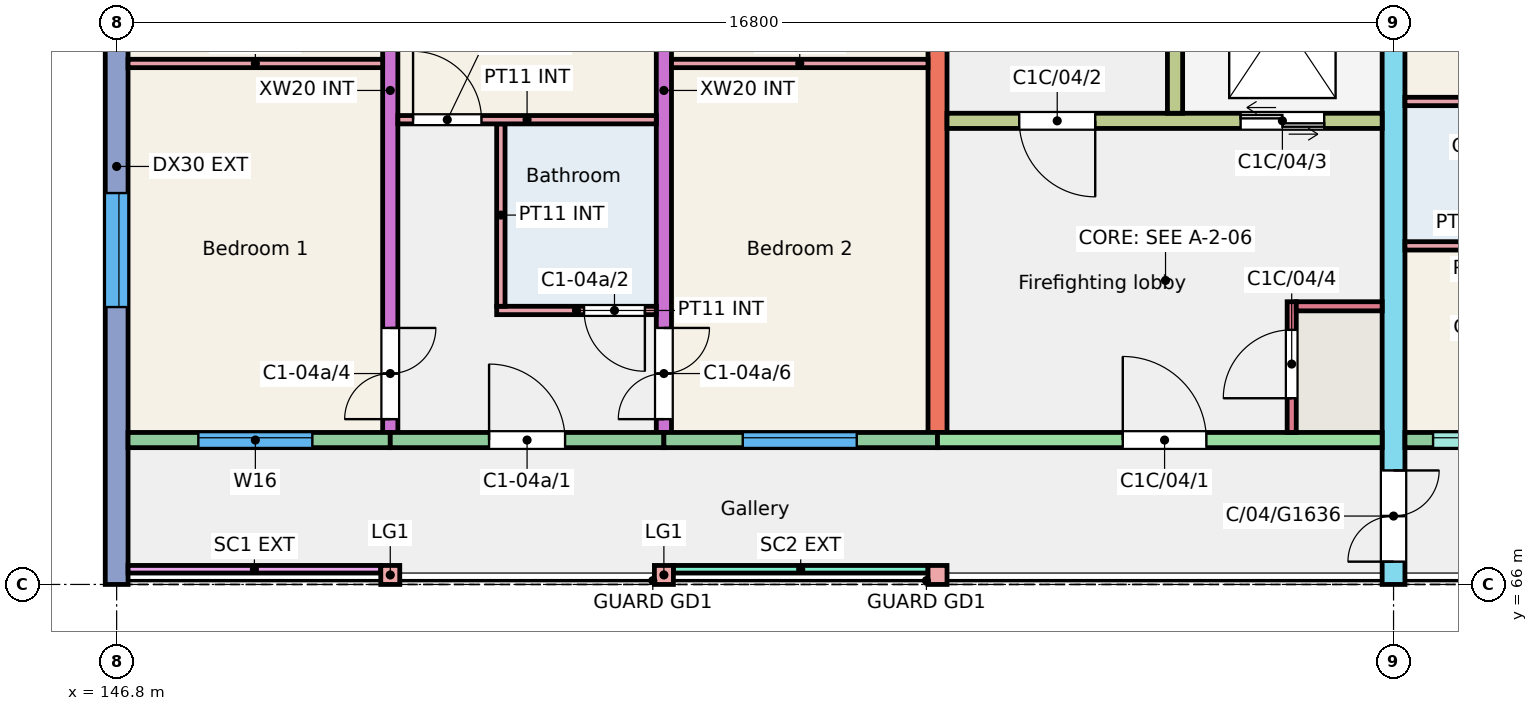
"""IFC4 building model, lengths in metres.
Left out: names, types, materials, properties, quantities, classifications, styles, units other than length and angle.
Written with IfcOpenShell. Run it as: python <this file> out.ifc"""

import sys

from ifc_helpers import new_model, si_unit, direction, frame, frame_2d, origin, origin_2d, place, context, subcontext, project, spatial, rectangle, extrude, element, fill, save


model = new_model("IFC4")
c1 = context("Model", 3, precision=1e-05, world=origin(), true_north=direction((0.0, 1.0)))
c2 = subcontext(c1, "Body", "Model", "MODEL_VIEW")
j1 = project(units=[si_unit("LENGTHUNIT", "METRE"), si_unit("PLANEANGLEUNIT", "RADIAN")], contexts=[c1])
p1 = place(None, origin())
s1 = spatial("IfcSite", under=j1, at=p1, CompositionType="ELEMENT")
p2 = place(p1, origin())
s2 = spatial("IfcBuilding", under=s1, at=p2, CompositionType="ELEMENT")
p3 = place(p2, frame((0.0, 0.0, 12.0)))
s3 = spatial("IfcBuildingStorey", under=s2, at=p3, CompositionType="ELEMENT", Elevation=12.0)
p4 = place(p3, frame((146.8, 66.0, 0.0), z_axis=(0.0, 0.0, 1.0), x_axis=(0.0, 1.0, 0.0)))
e1 = element("IfcWall", 1, at=p4, inside=s3, PredefinedType="SHEAR", context=c2, shape_type="SweptSolid", body=[
    extrude(rectangle(XDim=11.0, YDim=0.3, at=frame_2d((5.5, 0.0))), origin(), (0.0, 0.0, 1.0), 3.0),
])
p5 = place(p4, frame((3.65, 0.0, 0.9)))
e2 = element("IfcOpeningElement", 2, at=p5, cuts=e1, PredefinedType="OPENING", context=c2, shape_type="SweptSolid", body=[
    extrude(rectangle(XDim=1.5, YDim=1.5, at=frame_2d((0.75, 0.75))), frame((0.0, 0.16, 0.0), z_axis=(0.0, -1.0, 0.0), x_axis=(1.0, 0.0, 0.0)), (0.0, 0.0, 1.0), 0.32),
])
p6 = place(p4, frame((8.355, 0.0, 0.9)))
e3 = element("IfcOpeningElement", 3, at=p6, cuts=e1, PredefinedType="OPENING", context=c2, shape_type="SweptSolid", body=[
    extrude(rectangle(XDim=1.2, YDim=1.5, at=frame_2d((0.6, 0.75))), frame((0.0, 0.16, 0.0), z_axis=(0.0, -1.0, 0.0), x_axis=(1.0, 0.0, 0.0)), (0.0, 0.0, 1.0), 0.32),
])
p7 = place(p3, frame((150.4, 68.0, 0.0), z_axis=(0.0, 0.0, 1.0), x_axis=(0.0, 1.0, 0.0)))
e4 = element("IfcWall", 4, at=p7, inside=s3, PredefinedType="SHEAR", context=c2, shape_type="SweptSolid", body=[
    extrude(rectangle(XDim=9.0, YDim=0.2, at=frame_2d((4.5, 0.0))), origin(), (0.0, 0.0, 1.0), 3.0),
])
p8 = place(p7, frame((0.175, 0.0, 0.0)))
e5 = element("IfcOpeningElement", 5, at=p8, cuts=e4, PredefinedType="OPENING", context=c2, shape_type="SweptSolid", body=[
    extrude(rectangle(XDim=1.2, YDim=2.1, at=frame_2d((0.6, 1.05))), frame((0.0, 0.11, 0.0), z_axis=(0.0, -1.0, 0.0), x_axis=(1.0, 0.0, 0.0)), (0.0, 0.0, 1.0), 0.22),
])
p9 = place(p7, frame((6.4, 0.0, 0.0)))
e6 = element("IfcOpeningElement", 6, at=p9, cuts=e4, PredefinedType="OPENING", context=c2, shape_type="SweptSolid", body=[
    extrude(rectangle(XDim=1.2, YDim=2.1, at=frame_2d((0.6, 1.05))), frame((0.0, 0.11, 0.0), z_axis=(0.0, -1.0, 0.0), x_axis=(1.0, 0.0, 0.0)), (0.0, 0.0, 1.0), 0.22),
])
p10 = place(p3, frame((154.0, 68.0, 0.0), z_axis=(0.0, 0.0, 1.0), x_axis=(0.0, 1.0, 0.0)))
e7 = element("IfcWall", 7, at=p10, inside=s3, PredefinedType="SHEAR", context=c2, shape_type="SweptSolid", body=[
    extrude(rectangle(XDim=9.0, YDim=0.2, at=frame_2d((4.5, 0.0))), origin(), (0.0, 0.0, 1.0), 3.0),
])
p11 = place(p10, frame((0.175, 0.0, 0.0)))
e8 = element("IfcOpeningElement", 8, at=p11, cuts=e7, PredefinedType="OPENING", context=c2, shape_type="SweptSolid", body=[
    extrude(rectangle(XDim=1.2, YDim=2.1, at=frame_2d((0.6, 1.05))), frame((0.0, 0.11, 0.0), z_axis=(0.0, -1.0, 0.0), x_axis=(1.0, 0.0, 0.0)), (0.0, 0.0, 1.0), 0.22),
])
p12 = place(p10, frame((6.4, 0.0, 0.0)))
e9 = element("IfcOpeningElement", 9, at=p12, cuts=e7, PredefinedType="OPENING", context=c2, shape_type="SweptSolid", body=[
    extrude(rectangle(XDim=1.2, YDim=2.1, at=frame_2d((0.6, 1.05))), frame((0.0, 0.11, 0.0), z_axis=(0.0, -1.0, 0.0), x_axis=(1.0, 0.0, 0.0)), (0.0, 0.0, 1.0), 0.22),
])
p13 = place(p3, frame((157.6, 68.0, 0.0), z_axis=(0.0, 0.0, 1.0), x_axis=(0.0, 1.0, 0.0)))
e10 = element("IfcWall", 10, at=p13, inside=s3, PredefinedType="SHEAR", context=c2, shape_type="SweptSolid", body=[
    extrude(rectangle(XDim=9.0, YDim=0.25, at=frame_2d((4.5, 0.0))), origin(), (0.0, 0.0, 1.0), 3.0),
])
p14 = place(p3, frame((163.6, 66.0, 0.0), z_axis=(0.0, 0.0, 1.0), x_axis=(0.0, 1.0, 0.0)))
e11 = element("IfcWall", 11, at=p14, inside=s3, PredefinedType="SHEAR", context=c2, shape_type="SweptSolid", body=[
    extrude(rectangle(XDim=11.0, YDim=0.3, at=frame_2d((5.5, 0.0))), origin(), (0.0, 0.0, 1.0), 3.0),
])
p15 = place(p14, frame((0.3, 0.0, 0.0)))
e12 = element("IfcOpeningElement", 12, at=p15, cuts=e11, PredefinedType="OPENING", context=c2, shape_type="SweptSolid", body=[
    extrude(rectangle(XDim=1.2, YDim=2.1, at=frame_2d((0.6, 1.05))), frame((0.0, 0.16, 0.0), z_axis=(0.0, -1.0, 0.0), x_axis=(1.0, 0.0, 0.0)), (0.0, 0.0, 1.0), 0.32),
])
p16 = place(p3, frame((146.95, 67.9, 0.0), z_axis=(0.0, 0.0, 1.0), x_axis=(1.0, 0.0, 0.0)))
e13 = element("IfcWall", 13, at=p16, inside=s3, PredefinedType="SOLIDWALL", context=c2, shape_type="SweptSolid", body=[
    extrude(rectangle(XDim=3.45, YDim=0.2, at=frame_2d((1.725, 0.0))), origin(), (0.0, 0.0, 1.0), 3.0),
])
p17 = place(p16, frame((0.925, 0.0, 0.9)))
e14 = element("IfcOpeningElement", 14, at=p17, cuts=e13, PredefinedType="OPENING", context=c2, shape_type="SweptSolid", body=[
    extrude(rectangle(XDim=1.5, YDim=1.5, at=frame_2d((0.75, 0.75))), frame((0.0, 0.11, 0.0), z_axis=(0.0, -1.0, 0.0), x_axis=(1.0, 0.0, 0.0)), (0.0, 0.0, 1.0), 0.22),
])
p18 = place(p3, frame((150.4, 67.9, 0.0), z_axis=(0.0, 0.0, 1.0), x_axis=(1.0, 0.0, 0.0)))
e15 = element("IfcWall", 15, at=p18, inside=s3, PredefinedType="SOLIDWALL", context=c2, shape_type="SweptSolid", body=[
    extrude(rectangle(XDim=3.6, YDim=0.2, at=frame_2d((1.8, 0.0))), origin(), (0.0, 0.0, 1.0), 3.0),
])
p19 = place(p18, frame((1.3, 0.0, 0.0)))
e16 = element("IfcOpeningElement", 16, at=p19, cuts=e15, PredefinedType="OPENING", context=c2, shape_type="SweptSolid", body=[
    extrude(rectangle(XDim=1.0, YDim=2.1, at=frame_2d((0.5, 1.05))), frame((0.0, 0.11, 0.0), z_axis=(0.0, -1.0, 0.0), x_axis=(1.0, 0.0, 0.0)), (0.0, 0.0, 1.0), 0.22),
])
p20 = place(p3, frame((154.0, 67.9, 0.0), z_axis=(0.0, 0.0, 1.0), x_axis=(1.0, 0.0, 0.0)))
e17 = element("IfcWall", 17, at=p20, inside=s3, PredefinedType="SOLIDWALL", context=c2, shape_type="SweptSolid", body=[
    extrude(rectangle(XDim=3.6, YDim=0.2, at=frame_2d((1.8, 0.0))), origin(), (0.0, 0.0, 1.0), 3.0),
])
p21 = place(p20, frame((1.038, 0.0, 0.9)))
e18 = element("IfcOpeningElement", 18, at=p21, cuts=e17, PredefinedType="OPENING", context=c2, shape_type="SweptSolid", body=[
    extrude(rectangle(XDim=1.5, YDim=1.5, at=frame_2d((0.75, 0.75))), frame((0.0, 0.11, 0.0), z_axis=(0.0, -1.0, 0.0), x_axis=(1.0, 0.0, 0.0)), (0.0, 0.0, 1.0), 0.22),
])
p22 = place(p3, frame((157.6, 67.9, 0.0), z_axis=(0.0, 0.0, 1.0), x_axis=(1.0, 0.0, 0.0)))
e19 = element("IfcWall", 19, at=p22, inside=s3, PredefinedType="SHEAR", context=c2, shape_type="SweptSolid", body=[
    extrude(rectangle(XDim=5.85, YDim=0.2, at=frame_2d((2.925, 0.0))), origin(), (0.0, 0.0, 1.0), 3.0),
])
p23 = place(p22, frame((2.438, 0.0, 0.0)))
e20 = element("IfcOpeningElement", 20, at=p23, cuts=e19, PredefinedType="OPENING", context=c2, shape_type="SweptSolid", body=[
    extrude(rectangle(XDim=1.1, YDim=2.1, at=frame_2d((0.55, 1.05))), frame((0.0, 0.11, 0.0), z_axis=(0.0, -1.0, 0.0), x_axis=(1.0, 0.0, 0.0)), (0.0, 0.0, 1.0), 0.22),
])
p24 = place(p3, frame((157.725, 72.1, 0.0), z_axis=(0.0, 0.0, 1.0), x_axis=(1.0, 0.0, 0.0)))
e21 = element("IfcWall", 21, at=p24, inside=s3, PredefinedType="SHEAR", context=c2, shape_type="SweptSolid", body=[
    extrude(rectangle(XDim=5.725, YDim=0.2, at=frame_2d((2.862, 0.0))), origin(), (0.0, 0.0, 1.0), 3.0),
])
p25 = place(p24, frame((0.95, 0.0, 0.0)))
e22 = element("IfcOpeningElement", 22, at=p25, cuts=e21, PredefinedType="OPENING", context=c2, shape_type="SweptSolid", body=[
    extrude(rectangle(XDim=1.0, YDim=2.1, at=frame_2d((0.5, 1.05))), frame((0.0, 0.11, 0.0), z_axis=(0.0, -1.0, 0.0), x_axis=(1.0, 0.0, 0.0)), (0.0, 0.0, 1.0), 0.22),
])
p26 = place(p24, frame((3.863, 0.0, 0.0)))
e23 = element("IfcOpeningElement", 23, at=p26, cuts=e21, PredefinedType="OPENING", context=c2, shape_type="SweptSolid", body=[
    extrude(rectangle(XDim=1.1, YDim=2.1, at=frame_2d((0.55, 1.05))), frame((0.0, 0.11, 0.0), z_axis=(0.0, -1.0, 0.0), x_axis=(1.0, 0.0, 0.0)), (0.0, 0.0, 1.0), 0.22),
])
p27 = place(p3, frame((160.725, 72.2, 0.0), z_axis=(0.0, 0.0, 1.0), x_axis=(0.0, 1.0, 0.0)))
e24 = element("IfcWall", 24, at=p27, inside=s3, PredefinedType="SHEAR", context=c2, shape_type="SweptSolid", body=[
    extrude(rectangle(XDim=4.8, YDim=0.2, at=frame_2d((2.4, 0.0))), origin(), (0.0, 0.0, 1.0), 3.0),
])
p28 = place(p3, frame((162.26, 68.0, 0.0), z_axis=(0.0, 0.0, 1.0), x_axis=(0.0, 1.0, 0.0)))
e25 = element("IfcWall", 25, at=p28, inside=s3, PredefinedType="SHEAR", context=c2, shape_type="SweptSolid", body=[
    extrude(rectangle(XDim=1.72, YDim=0.12, at=frame_2d((0.86, 0.0))), origin(), (0.0, 0.0, 1.0), 3.0),
])
p29 = place(p28, frame((0.45, 0.0, 0.0)))
e26 = element("IfcOpeningElement", 26, at=p29, cuts=e25, PredefinedType="OPENING", context=c2, shape_type="SweptSolid", body=[
    extrude(rectangle(XDim=0.9, YDim=2.1, at=frame_2d((0.45, 1.05))), frame((0.0, 0.07, 0.0), z_axis=(0.0, -1.0, 0.0), x_axis=(1.0, 0.0, 0.0)), (0.0, 0.0, 1.0), 0.14),
])
p30 = place(p3, frame((162.32, 69.66, 0.0), z_axis=(0.0, 0.0, 1.0), x_axis=(1.0, 0.0, 0.0)))
e27 = element("IfcWall", 27, at=p30, inside=s3, PredefinedType="SHEAR", context=c2, shape_type="SweptSolid", body=[
    extrude(rectangle(XDim=1.13, YDim=0.12, at=frame_2d((0.565, 0.0))), origin(), (0.0, 0.0, 1.0), 3.0),
])
p31 = place(p3, frame((163.75, 67.9, 0.0), z_axis=(0.0, 0.0, 1.0), x_axis=(1.0, 0.0, 0.0)))
e28 = element("IfcWall", 28, at=p31, inside=s3, PredefinedType="SOLIDWALL", context=c2, shape_type="SweptSolid", body=[
    extrude(rectangle(XDim=3.45, YDim=0.2, at=frame_2d((1.725, 0.0))), origin(), (0.0, 0.0, 1.0), 3.0),
])
p32 = place(p31, frame((0.37, 0.0, 1.1)))
e29 = element("IfcOpeningElement", 29, at=p32, cuts=e28, PredefinedType="OPENING", context=c2, shape_type="SweptSolid", body=[
    extrude(rectangle(XDim=1.2, YDim=1.3, at=frame_2d((0.6, 0.65))), frame((0.0, 0.11, 0.0), z_axis=(0.0, -1.0, 0.0), x_axis=(1.0, 0.0, 0.0)), (0.0, 0.0, 1.0), 0.22),
])
p33 = place(p31, frame((2.2, 0.0, 0.0)))
e30 = element("IfcOpeningElement", 30, at=p33, cuts=e28, PredefinedType="OPENING", context=c2, shape_type="SweptSolid", body=[
    extrude(rectangle(XDim=1.0, YDim=2.1, at=frame_2d((0.5, 1.05))), frame((0.0, 0.11, 0.0), z_axis=(0.0, -1.0, 0.0), x_axis=(1.0, 0.0, 0.0)), (0.0, 0.0, 1.0), 0.22),
])
for number, where, z_axis, x_axis in (
    (31, (150.4, 66.125, 0.0), (0.0, 0.0, 1.0), (1.0, 0.0, 0.0)),
    (32, (154.0, 66.125, 0.0), (0.0, 0.0, 1.0), (1.0, 0.0, 0.0)),
    (33, (157.6, 66.125, 0.0), (0.0, 0.0, 1.0), (1.0, 0.0, 0.0)),
):
    element("IfcColumn", number, at=place(p3, frame(where, z_axis=z_axis, x_axis=x_axis)), inside=s3, PredefinedType="COLUMN", context=c2, shape_type="SweptSolid", body=[
        extrude(rectangle(XDim=0.25, YDim=0.25, at=origin_2d()), origin(), (0.0, 0.0, 1.0), 3.0),
    ])
p34 = place(p3, frame((146.95, 66.2, 0.0), z_axis=(0.0, 0.0, 1.0), x_axis=(1.0, 0.0, 0.0)))
e34 = element("IfcWall", 34, at=p34, inside=s3, PredefinedType="SOLIDWALL", context=c2, shape_type="SweptSolid", body=[
    extrude(rectangle(XDim=3.325, YDim=0.1, at=frame_2d((1.663, 0.0))), origin(), (0.0, 0.0, 1.0), 2.45),
])
p35 = place(p3, frame((154.125, 66.2, 0.0), z_axis=(0.0, 0.0, 1.0), x_axis=(1.0, 0.0, 0.0)))
e35 = element("IfcWall", 35, at=p35, inside=s3, PredefinedType="SOLIDWALL", context=c2, shape_type="SweptSolid", body=[
    extrude(rectangle(XDim=3.35, YDim=0.1, at=frame_2d((1.675, 0.0))), origin(), (0.0, 0.0, 1.0), 2.45),
])
p36 = place(p3, frame((151.8, 69.605, 0.0), z_axis=(0.0, 0.0, 1.0), x_axis=(1.0, 0.0, 0.0)))
e36 = element("IfcWall", 36, at=p36, inside=s3, PredefinedType="PARTITIONING", context=c2, shape_type="SweptSolid", body=[
    extrude(rectangle(XDim=2.1, YDim=0.11, at=frame_2d((1.05, 0.0))), origin(), (0.0, 0.0, 1.0), 2.8),
])
p37 = place(p36, frame((1.15, 0.0, 0.0)))
e37 = element("IfcOpeningElement", 37, at=p37, cuts=e36, PredefinedType="OPENING", context=c2, shape_type="SweptSolid", body=[
    extrude(rectangle(XDim=0.8, YDim=2.1, at=frame_2d((0.4, 1.05))), frame((0.0, 0.065, 0.0), z_axis=(0.0, -1.0, 0.0), x_axis=(1.0, 0.0, 0.0)), (0.0, 0.0, 1.0), 0.13),
])
p38 = place(p3, frame((151.855, 69.66, 0.0), z_axis=(0.0, 0.0, 1.0), x_axis=(0.0, 1.0, 0.0)))
e38 = element("IfcWall", 38, at=p38, inside=s3, PredefinedType="PARTITIONING", context=c2, shape_type="SweptSolid", body=[
    extrude(rectangle(XDim=2.4, YDim=0.11, at=frame_2d((1.2, 0.0))), origin(), (0.0, 0.0, 1.0), 2.8),
])
p39 = place(p3, frame((150.5, 72.115, 0.0), z_axis=(0.0, 0.0, 1.0), x_axis=(1.0, 0.0, 0.0)))
e39 = element("IfcWall", 39, at=p39, inside=s3, PredefinedType="PARTITIONING", context=c2, shape_type="SweptSolid", body=[
    extrude(rectangle(XDim=3.4, YDim=0.11, at=frame_2d((1.7, 0.0))), origin(), (0.0, 0.0, 1.0), 2.8),
])
p40 = place(p39, frame((0.2, 0.0, 0.0)))
e40 = element("IfcOpeningElement", 40, at=p40, cuts=e39, PredefinedType="OPENING", context=c2, shape_type="SweptSolid", body=[
    extrude(rectangle(XDim=0.9, YDim=2.1, at=frame_2d((0.45, 1.05))), frame((0.0, 0.065, 0.0), z_axis=(0.0, -1.0, 0.0), x_axis=(1.0, 0.0, 0.0)), (0.0, 0.0, 1.0), 0.13),
])
p41 = place(p3, frame((146.95, 72.855, 0.0), z_axis=(0.0, 0.0, 1.0), x_axis=(1.0, 0.0, 0.0)))
e41 = element("IfcWall", 41, at=p41, inside=s3, PredefinedType="PARTITIONING", context=c2, shape_type="SweptSolid", body=[
    extrude(rectangle(XDim=3.35, YDim=0.11, at=frame_2d((1.675, 0.0))), origin(), (0.0, 0.0, 1.0), 2.8),
])
p42 = place(p3, frame((154.1, 72.855, 0.0), z_axis=(0.0, 0.0, 1.0), x_axis=(1.0, 0.0, 0.0)))
e42 = element("IfcWall", 42, at=p42, inside=s3, PredefinedType="PARTITIONING", context=c2, shape_type="SweptSolid", body=[
    extrude(rectangle(XDim=3.375, YDim=0.11, at=frame_2d((1.688, 0.0))), origin(), (0.0, 0.0, 1.0), 2.8),
])
p43 = place(p3, frame((163.75, 70.455, 0.0), z_axis=(0.0, 0.0, 1.0), x_axis=(1.0, 0.0, 0.0)))
e43 = element("IfcWall", 43, at=p43, inside=s3, PredefinedType="PARTITIONING", context=c2, shape_type="SweptSolid", body=[
    extrude(rectangle(XDim=1.94, YDim=0.11, at=frame_2d((0.97, 0.0))), origin(), (0.0, 0.0, 1.0), 2.8),
])
p44 = place(p3, frame((163.75, 72.355, 0.0), z_axis=(0.0, 0.0, 1.0), x_axis=(1.0, 0.0, 0.0)))
e44 = element("IfcWall", 44, at=p44, inside=s3, PredefinedType="PARTITIONING", context=c2, shape_type="SweptSolid", body=[
    extrude(rectangle(XDim=3.35, YDim=0.11, at=frame_2d((1.675, 0.0))), origin(), (0.0, 0.0, 1.0), 2.8),
])
p45 = place(p44, frame((2.25, 0.0, 0.0)))
e45 = element("IfcOpeningElement", 45, at=p45, cuts=e44, PredefinedType="OPENING", context=c2, shape_type="SweptSolid", body=[
    extrude(rectangle(XDim=0.9, YDim=2.1, at=frame_2d((0.45, 1.05))), frame((0.0, 0.065, 0.0), z_axis=(0.0, -1.0, 0.0), x_axis=(1.0, 0.0, 0.0)), (0.0, 0.0, 1.0), 0.13),
])
p46 = place(p17, origin())
e46 = element("IfcWindow", 46, at=p46, inside=s3, PartitioningType="SINGLE_PANEL", PredefinedType="WINDOW", context=c2, shape_type="SweptSolid", body=[
    extrude(rectangle(XDim=1.5, YDim=1.5, at=frame_2d((0.75, 0.75))), frame((0.0, 0.06, 0.0), z_axis=(0.0, -1.0, 0.0), x_axis=(1.0, 0.0, 0.0)), (0.0, 0.0, 1.0), 0.06),
])
fill(e14, e46)
p47 = place(p21, origin())
e47 = element("IfcWindow", 47, at=p47, inside=s3, PartitioningType="SINGLE_PANEL", PredefinedType="WINDOW", context=c2, shape_type="SweptSolid", body=[
    extrude(rectangle(XDim=1.5, YDim=1.5, at=frame_2d((0.75, 0.75))), frame((0.0, 0.06, 0.0), z_axis=(0.0, -1.0, 0.0), x_axis=(1.0, 0.0, 0.0)), (0.0, 0.0, 1.0), 0.06),
])
fill(e18, e47)
p48 = place(p5, origin())
e48 = element("IfcWindow", 48, at=p48, inside=s3, PartitioningType="SINGLE_PANEL", PredefinedType="WINDOW", context=c2, shape_type="SweptSolid", body=[
    extrude(rectangle(XDim=1.5, YDim=1.5, at=frame_2d((0.75, 0.75))), frame((0.0, 0.0, 0.0), z_axis=(0.0, -1.0, 0.0), x_axis=(1.0, 0.0, 0.0)), (0.0, 0.0, 1.0), 0.06),
])
fill(e2, e48)
p49 = place(p32, origin())
e49 = element("IfcWindow", 49, at=p49, inside=s3, PartitioningType="SINGLE_PANEL", PredefinedType="WINDOW", context=c2, shape_type="SweptSolid", body=[
    extrude(rectangle(XDim=1.2, YDim=1.3, at=frame_2d((0.6, 0.65))), frame((0.0, 0.06, 0.0), z_axis=(0.0, -1.0, 0.0), x_axis=(1.0, 0.0, 0.0)), (0.0, 0.0, 1.0), 0.06),
])
fill(e29, e49)
p50 = place(p19, origin())
e50 = element("IfcDoor", 50, at=p50, inside=s3, OperationType="SINGLE_SWING_LEFT", PredefinedType="DOOR", context=c2, shape_type="SweptSolid", body=[
    extrude(rectangle(XDim=1.0, YDim=2.1, at=frame_2d((0.5, 1.05))), frame((0.0, 0.025, 0.0), z_axis=(0.0, -1.0, 0.0), x_axis=(1.0, 0.0, 0.0)), (0.0, 0.0, 1.0), 0.05),
])
fill(e16, e50)
p51 = place(p37, origin())
e51 = element("IfcDoor", 51, at=p51, inside=s3, OperationType="SINGLE_SWING_RIGHT", PredefinedType="DOOR", context=c2, shape_type="SweptSolid", body=[
    extrude(rectangle(XDim=0.8, YDim=2.1, at=frame_2d((0.4, 1.05))), frame((0.0, 0.025, 0.0), z_axis=(0.0, -1.0, 0.0), x_axis=(1.0, 0.0, 0.0)), (0.0, 0.0, 1.0), 0.05),
])
fill(e37, e51)
p52 = place(p40, origin())
e52 = element("IfcDoor", 52, at=p52, inside=s3, OperationType="SINGLE_SWING_LEFT", PredefinedType="DOOR", context=c2, shape_type="SweptSolid", body=[
    extrude(rectangle(XDim=0.9, YDim=2.1, at=frame_2d((0.45, 1.05))), frame((0.0, 0.025, 0.0), z_axis=(0.0, -1.0, 0.0), x_axis=(1.0, 0.0, 0.0)), (0.0, 0.0, 1.0), 0.05),
])
fill(e40, e52)
p53 = place(p8, origin())
e53 = element("IfcDoor", 53, at=p53, inside=s3, OperationType="DOUBLE_DOOR_SINGLE_SWING", PredefinedType="DOOR", context=c2, shape_type="SweptSolid", body=[
    extrude(rectangle(XDim=1.2, YDim=2.1, at=frame_2d((0.6, 1.05))), frame((0.0, 0.025, 0.0), z_axis=(0.0, -1.0, 0.0), x_axis=(1.0, 0.0, 0.0)), (0.0, 0.0, 1.0), 0.05),
])
fill(e5, e53)
p54 = place(p11, origin())
e54 = element("IfcDoor", 54, at=p54, inside=s3, OperationType="DOUBLE_DOOR_SINGLE_SWING", PredefinedType="DOOR", context=c2, shape_type="SweptSolid", body=[
    extrude(rectangle(XDim=1.2, YDim=2.1, at=frame_2d((0.6, 1.05))), frame((0.0, 0.025, 0.0), z_axis=(0.0, -1.0, 0.0), x_axis=(1.0, 0.0, 0.0)), (0.0, 0.0, 1.0), 0.05),
])
fill(e8, e54)
p55 = place(p23, origin())
e55 = element("IfcDoor", 55, at=p55, inside=s3, OperationType="SINGLE_SWING_LEFT", PredefinedType="DOOR", context=c2, shape_type="SweptSolid", body=[
    extrude(rectangle(XDim=1.1, YDim=2.1, at=frame_2d((0.55, 1.05))), frame((0.0, 0.025, 0.0), z_axis=(0.0, -1.0, 0.0), x_axis=(1.0, 0.0, 0.0)), (0.0, 0.0, 1.0), 0.05),
])
fill(e20, e55)
p56 = place(p25, origin())
e56 = element("IfcDoor", 56, at=p56, inside=s3, OperationType="SINGLE_SWING_RIGHT", PredefinedType="DOOR", context=c2, shape_type="SweptSolid", body=[
    extrude(rectangle(XDim=1.0, YDim=2.1, at=frame_2d((0.5, 1.05))), frame((0.0, 0.025, 0.0), z_axis=(0.0, -1.0, 0.0), x_axis=(1.0, 0.0, 0.0)), (0.0, 0.0, 1.0), 0.05),
])
fill(e22, e56)
p57 = place(p26, origin())
e57 = element("IfcDoor", 57, at=p57, inside=s3, OperationType="DOUBLE_DOOR_SLIDING", PredefinedType="DOOR", context=c2, shape_type="SweptSolid", body=[
    extrude(rectangle(XDim=1.1, YDim=2.1, at=frame_2d((0.55, 1.05))), frame((0.0, 0.025, 0.0), z_axis=(0.0, -1.0, 0.0), x_axis=(1.0, 0.0, 0.0)), (0.0, 0.0, 1.0), 0.05),
])
fill(e23, e57)
p58 = place(p29, origin())
e58 = element("IfcDoor", 58, at=p58, inside=s3, OperationType="SINGLE_SWING_LEFT", PredefinedType="DOOR", context=c2, shape_type="SweptSolid", body=[
    extrude(rectangle(XDim=0.9, YDim=2.1, at=frame_2d((0.45, 1.05))), frame((0.0, 0.025, 0.0), z_axis=(0.0, -1.0, 0.0), x_axis=(1.0, 0.0, 0.0)), (0.0, 0.0, 1.0), 0.05),
])
fill(e26, e58)
p59 = place(p15, origin())
e59 = element("IfcDoor", 59, at=p59, inside=s3, OperationType="DOUBLE_DOOR_SINGLE_SWING", PredefinedType="DOOR", context=c2, shape_type="SweptSolid", body=[
    extrude(rectangle(XDim=1.2, YDim=2.1, at=frame_2d((0.6, 1.05))), frame((0.0, 0.025, 0.0), z_axis=(0.0, -1.0, 0.0), x_axis=(1.0, 0.0, 0.0)), (0.0, 0.0, 1.0), 0.05),
])
fill(e12, e59)
save(model, sys.argv[1])
